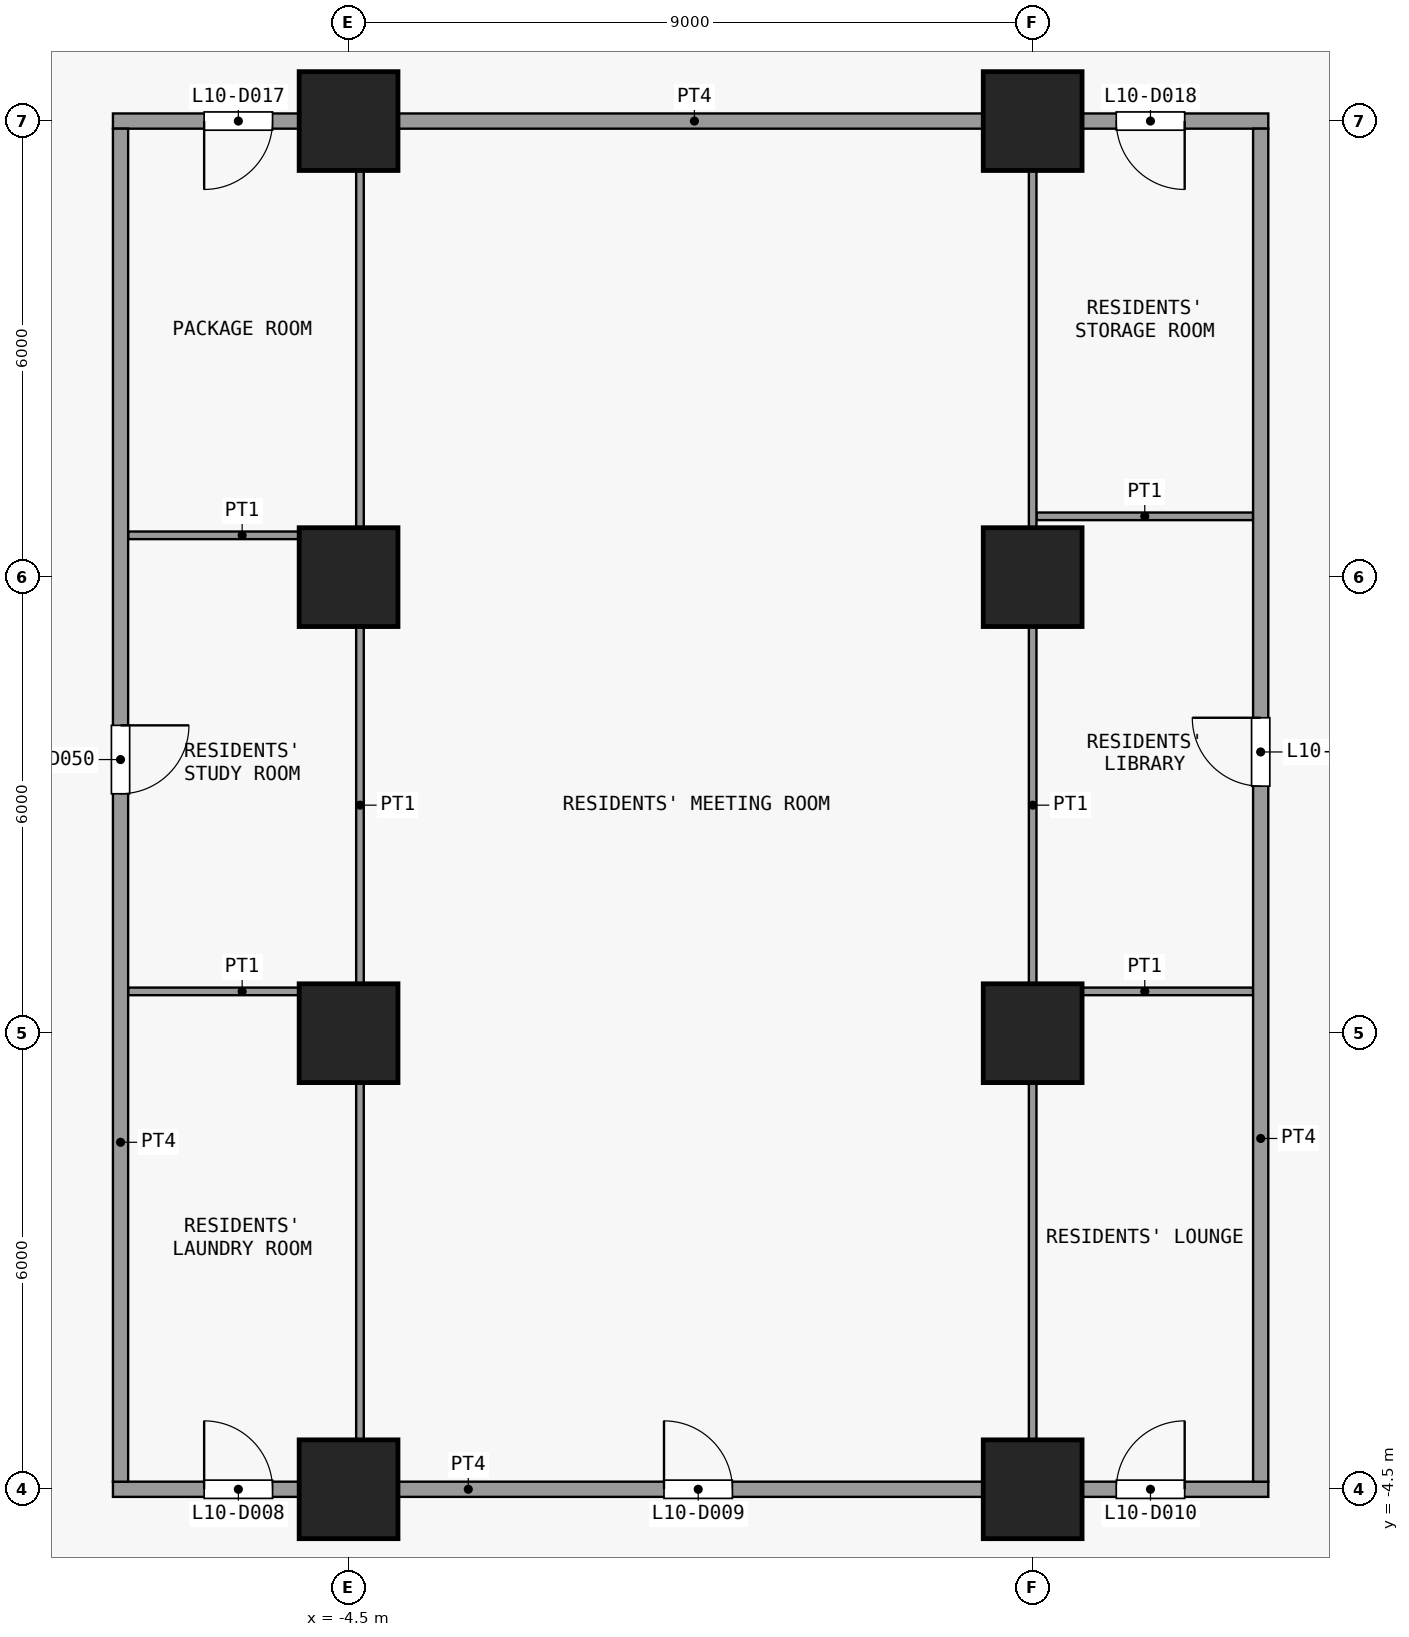
"""IFC4 building model, lengths in metres.
Left out: names, types, materials, properties, quantities, classifications, styles, units other than length and angle.
Written with IfcOpenShell. Run it as: python <this file> out.ifc"""

import sys

from ifc_helpers import new_model, si_unit, direction, frame, frame_2d, origin, origin_2d, place, context, subcontext, project, spatial, rectangle, extrude, element, fill, save


model = new_model("IFC4")
c1 = context("Model", 3, precision=1e-05, world=origin(), true_north=direction((0.0, 1.0)))
c2 = subcontext(c1, "Body", "Model", "MODEL_VIEW")
j1 = project(units=[si_unit("LENGTHUNIT", "METRE"), si_unit("PLANEANGLEUNIT", "RADIAN")], contexts=[c1])
p1 = place(None, origin())
s1 = spatial("IfcSite", under=j1, at=p1, CompositionType="ELEMENT")
p2 = place(p1, origin())
s2 = spatial("IfcBuilding", under=s1, at=p2, CompositionType="ELEMENT")
p3 = place(p2, frame((0.0, 0.0, 46.9)))
s3 = spatial("IfcBuildingStorey", under=s2, at=p3, CompositionType="ELEMENT", Elevation=46.9)
for number, where, z_axis, x_axis in (
    (1, (-4.5, -4.5, 0.0), (0.0, 0.0, 1.0), (1.0, 0.0, 0.0)),
    (2, (-4.5, 1.5, 0.0), (0.0, 0.0, 1.0), (1.0, 0.0, 0.0)),
    (3, (-4.5, 7.5, 0.0), (0.0, 0.0, 1.0), (1.0, 0.0, 0.0)),
    (4, (-4.5, 13.5, 0.0), (0.0, 0.0, 1.0), (1.0, 0.0, 0.0)),
    (5, (4.5, -4.5, 0.0), (0.0, 0.0, 1.0), (1.0, 0.0, 0.0)),
    (6, (4.5, 1.5, 0.0), (0.0, 0.0, 1.0), (1.0, 0.0, 0.0)),
    (7, (4.5, 7.5, 0.0), (0.0, 0.0, 1.0), (1.0, 0.0, 0.0)),
    (8, (4.5, 13.5, 0.0), (0.0, 0.0, 1.0), (1.0, 0.0, 0.0)),
):
    element("IfcColumn", number, at=place(p3, frame(where, z_axis=z_axis, x_axis=x_axis)), inside=s3, PredefinedType="COLUMN", context=c2, shape_type="SweptSolid", body=[
        extrude(rectangle(XDim=1.3, YDim=1.3, at=origin_2d()), origin(), (0.0, 0.0, 1.0), 3.6),
    ])
p4 = place(p3, frame((-7.6, -4.5, 0.0), z_axis=(0.0, 0.0, 1.0), x_axis=(1.0, 0.0, 0.0)))
e9 = element("IfcWall", 9, at=p4, inside=s3, PredefinedType="PARTITIONING", context=c2, shape_type="SweptSolid", body=[
    extrude(rectangle(XDim=15.2, YDim=0.2, at=frame_2d((7.6, 0.0))), origin(), (0.0, 0.0, 1.0), 3.3),
])
p5 = place(p4, frame((1.2, 0.0, 0.0)))
e10 = element("IfcOpeningElement", 10, at=p5, cuts=e9, PredefinedType="OPENING", context=c2, shape_type="SweptSolid", body=[
    extrude(rectangle(XDim=0.9, YDim=2.1, at=frame_2d((0.45, 1.05))), frame((0.0, 0.11, 0.0), z_axis=(0.0, -1.0, 0.0), x_axis=(1.0, 0.0, 0.0)), (0.0, 0.0, 1.0), 0.22),
])
p6 = place(p4, frame((7.25, 0.0, 0.0)))
e11 = element("IfcOpeningElement", 11, at=p6, cuts=e9, PredefinedType="OPENING", context=c2, shape_type="SweptSolid", body=[
    extrude(rectangle(XDim=0.9, YDim=2.1, at=frame_2d((0.45, 1.05))), frame((0.0, 0.11, 0.0), z_axis=(0.0, -1.0, 0.0), x_axis=(1.0, 0.0, 0.0)), (0.0, 0.0, 1.0), 0.22),
])
p7 = place(p4, frame((13.2, 0.0, 0.0)))
e12 = element("IfcOpeningElement", 12, at=p7, cuts=e9, PredefinedType="OPENING", context=c2, shape_type="SweptSolid", body=[
    extrude(rectangle(XDim=0.9, YDim=2.1, at=frame_2d((0.45, 1.05))), frame((0.0, 0.11, 0.0), z_axis=(0.0, -1.0, 0.0), x_axis=(1.0, 0.0, 0.0)), (0.0, 0.0, 1.0), 0.22),
])
p8 = place(p3, frame((-7.4, 2.05, 0.0), z_axis=(0.0, 0.0, 1.0), x_axis=(1.0, 0.0, 0.0)))
e13 = element("IfcWall", 13, at=p8, inside=s3, PredefinedType="PARTITIONING", context=c2, shape_type="SweptSolid", body=[
    extrude(rectangle(XDim=3.0, YDim=0.1, at=frame_2d((1.5, 0.0))), origin(), (0.0, 0.0, 1.0), 3.3),
])
p9 = place(p3, frame((4.55, 2.05, 0.0), z_axis=(0.0, 0.0, 1.0), x_axis=(1.0, 0.0, 0.0)))
e14 = element("IfcWall", 14, at=p9, inside=s3, PredefinedType="PARTITIONING", context=c2, shape_type="SweptSolid", body=[
    extrude(rectangle(XDim=2.85, YDim=0.1, at=frame_2d((1.425, 0.0))), origin(), (0.0, 0.0, 1.0), 3.3),
])
p10 = place(p3, frame((-7.4, 8.05, 0.0), z_axis=(0.0, 0.0, 1.0), x_axis=(1.0, 0.0, 0.0)))
e15 = element("IfcWall", 15, at=p10, inside=s3, PredefinedType="PARTITIONING", context=c2, shape_type="SweptSolid", body=[
    extrude(rectangle(XDim=3.0, YDim=0.1, at=frame_2d((1.5, 0.0))), origin(), (0.0, 0.0, 1.0), 3.3),
])
p11 = place(p3, frame((4.55, 8.3, 0.0), z_axis=(0.0, 0.0, 1.0), x_axis=(1.0, 0.0, 0.0)))
e16 = element("IfcWall", 16, at=p11, inside=s3, PredefinedType="PARTITIONING", context=c2, shape_type="SweptSolid", body=[
    extrude(rectangle(XDim=2.85, YDim=0.1, at=frame_2d((1.425, 0.0))), origin(), (0.0, 0.0, 1.0), 3.3),
])
p12 = place(p3, frame((-7.6, 13.5, 0.0), z_axis=(0.0, 0.0, 1.0), x_axis=(1.0, 0.0, 0.0)))
e17 = element("IfcWall", 17, at=p12, inside=s3, PredefinedType="PARTITIONING", context=c2, shape_type="SweptSolid", body=[
    extrude(rectangle(XDim=15.2, YDim=0.2, at=frame_2d((7.6, 0.0))), origin(), (0.0, 0.0, 1.0), 3.3),
])
p13 = place(p12, frame((1.2, 0.0, 0.0)))
e18 = element("IfcOpeningElement", 18, at=p13, cuts=e17, PredefinedType="OPENING", context=c2, shape_type="SweptSolid", body=[
    extrude(rectangle(XDim=0.9, YDim=2.1, at=frame_2d((0.45, 1.05))), frame((0.0, 0.11, 0.0), z_axis=(0.0, -1.0, 0.0), x_axis=(1.0, 0.0, 0.0)), (0.0, 0.0, 1.0), 0.22),
])
p14 = place(p12, frame((13.2, 0.0, 0.0)))
e19 = element("IfcOpeningElement", 19, at=p14, cuts=e17, PredefinedType="OPENING", context=c2, shape_type="SweptSolid", body=[
    extrude(rectangle(XDim=0.9, YDim=2.1, at=frame_2d((0.45, 1.05))), frame((0.0, 0.11, 0.0), z_axis=(0.0, -1.0, 0.0), x_axis=(1.0, 0.0, 0.0)), (0.0, 0.0, 1.0), 0.22),
])
p15 = place(p3, frame((-7.5, -4.4, 0.0), z_axis=(0.0, 0.0, 1.0), x_axis=(0.0, 1.0, 0.0)))
e20 = element("IfcWall", 20, at=p15, inside=s3, PredefinedType="PARTITIONING", context=c2, shape_type="SweptSolid", body=[
    extrude(rectangle(XDim=17.8, YDim=0.2, at=frame_2d((8.9, 0.0))), origin(), (0.0, 0.0, 1.0), 3.3),
])
p16 = place(p15, frame((9.05, 0.0, 0.0)))
e21 = element("IfcOpeningElement", 21, at=p16, cuts=e20, PredefinedType="OPENING", context=c2, shape_type="SweptSolid", body=[
    extrude(rectangle(XDim=0.9, YDim=2.1, at=frame_2d((0.45, 1.05))), frame((0.0, 0.11, 0.0), z_axis=(0.0, -1.0, 0.0), x_axis=(1.0, 0.0, 0.0)), (0.0, 0.0, 1.0), 0.22),
])
for number, where, z_axis, x_axis in (
    (22, (-4.35, -4.4, 0.0), (0.0, 0.0, 1.0), (0.0, 1.0, 0.0)),
    (23, (4.5, -4.4, 0.0), (0.0, 0.0, 1.0), (0.0, 1.0, 0.0)),
):
    element("IfcWall", number, at=place(p3, frame(where, z_axis=z_axis, x_axis=x_axis)), inside=s3, PredefinedType="PARTITIONING", context=c2, shape_type="SweptSolid", body=[
        extrude(rectangle(XDim=17.8, YDim=0.1, at=frame_2d((8.9, 0.0))), origin(), (0.0, 0.0, 1.0), 3.3),
    ])
p17 = place(p3, frame((7.5, -4.4, 0.0), z_axis=(0.0, 0.0, 1.0), x_axis=(0.0, 1.0, 0.0)))
e24 = element("IfcWall", 24, at=p17, inside=s3, PredefinedType="PARTITIONING", context=c2, shape_type="SweptSolid", body=[
    extrude(rectangle(XDim=17.8, YDim=0.2, at=frame_2d((8.9, 0.0))), origin(), (0.0, 0.0, 1.0), 3.3),
])
p18 = place(p17, frame((9.15, 0.0, 0.0)))
e25 = element("IfcOpeningElement", 25, at=p18, cuts=e24, PredefinedType="OPENING", context=c2, shape_type="SweptSolid", body=[
    extrude(rectangle(XDim=0.9, YDim=2.1, at=frame_2d((0.45, 1.05))), frame((0.0, 0.11, 0.0), z_axis=(0.0, -1.0, 0.0), x_axis=(1.0, 0.0, 0.0)), (0.0, 0.0, 1.0), 0.22),
])
p19 = place(p5, origin())
e26 = element("IfcDoor", 26, at=p19, inside=s3, OperationType="SINGLE_SWING_RIGHT", PredefinedType="DOOR", context=c2, shape_type="SweptSolid", body=[
    extrude(rectangle(XDim=0.9, YDim=2.1, at=frame_2d((0.45, 1.05))), frame((0.0, 0.025, 0.0), z_axis=(0.0, -1.0, 0.0), x_axis=(1.0, 0.0, 0.0)), (0.0, 0.0, 1.0), 0.05),
])
fill(e10, e26)
p20 = place(p6, origin())
e27 = element("IfcDoor", 27, at=p20, inside=s3, OperationType="SINGLE_SWING_RIGHT", PredefinedType="DOOR", context=c2, shape_type="SweptSolid", body=[
    extrude(rectangle(XDim=0.9, YDim=2.1, at=frame_2d((0.45, 1.05))), frame((0.0, 0.025, 0.0), z_axis=(0.0, -1.0, 0.0), x_axis=(1.0, 0.0, 0.0)), (0.0, 0.0, 1.0), 0.05),
])
fill(e11, e27)
p21 = place(p7, origin())
e28 = element("IfcDoor", 28, at=p21, inside=s3, OperationType="SINGLE_SWING_LEFT", PredefinedType="DOOR", context=c2, shape_type="SweptSolid", body=[
    extrude(rectangle(XDim=0.9, YDim=2.1, at=frame_2d((0.45, 1.05))), frame((0.0, 0.025, 0.0), z_axis=(0.0, -1.0, 0.0), x_axis=(1.0, 0.0, 0.0)), (0.0, 0.0, 1.0), 0.05),
])
fill(e12, e28)
p22 = place(p13, origin())
e29 = element("IfcDoor", 29, at=p22, inside=s3, OperationType="SINGLE_SWING_LEFT", PredefinedType="DOOR", context=c2, shape_type="SweptSolid", body=[
    extrude(rectangle(XDim=0.9, YDim=2.1, at=frame_2d((0.45, 1.05))), frame((0.0, 0.025, 0.0), z_axis=(0.0, -1.0, 0.0), x_axis=(1.0, 0.0, 0.0)), (0.0, 0.0, 1.0), 0.05),
])
fill(e18, e29)
p23 = place(p14, origin())
e30 = element("IfcDoor", 30, at=p23, inside=s3, OperationType="SINGLE_SWING_RIGHT", PredefinedType="DOOR", context=c2, shape_type="SweptSolid", body=[
    extrude(rectangle(XDim=0.9, YDim=2.1, at=frame_2d((0.45, 1.05))), frame((0.0, 0.025, 0.0), z_axis=(0.0, -1.0, 0.0), x_axis=(1.0, 0.0, 0.0)), (0.0, 0.0, 1.0), 0.05),
])
fill(e19, e30)
p24 = place(p16, origin())
e31 = element("IfcDoor", 31, at=p24, inside=s3, OperationType="SINGLE_SWING_RIGHT", PredefinedType="DOOR", context=c2, shape_type="SweptSolid", body=[
    extrude(rectangle(XDim=0.9, YDim=2.1, at=frame_2d((0.45, 1.05))), frame((0.0, 0.025, 0.0), z_axis=(0.0, -1.0, 0.0), x_axis=(1.0, 0.0, 0.0)), (0.0, 0.0, 1.0), 0.05),
])
fill(e21, e31)
p25 = place(p18, origin())
e32 = element("IfcDoor", 32, at=p25, inside=s3, OperationType="SINGLE_SWING_LEFT", PredefinedType="DOOR", context=c2, shape_type="SweptSolid", body=[
    extrude(rectangle(XDim=0.9, YDim=2.1, at=frame_2d((0.45, 1.05))), frame((0.0, 0.025, 0.0), z_axis=(0.0, -1.0, 0.0), x_axis=(1.0, 0.0, 0.0)), (0.0, 0.0, 1.0), 0.05),
])
fill(e25, e32)
save(model, sys.argv[1])
